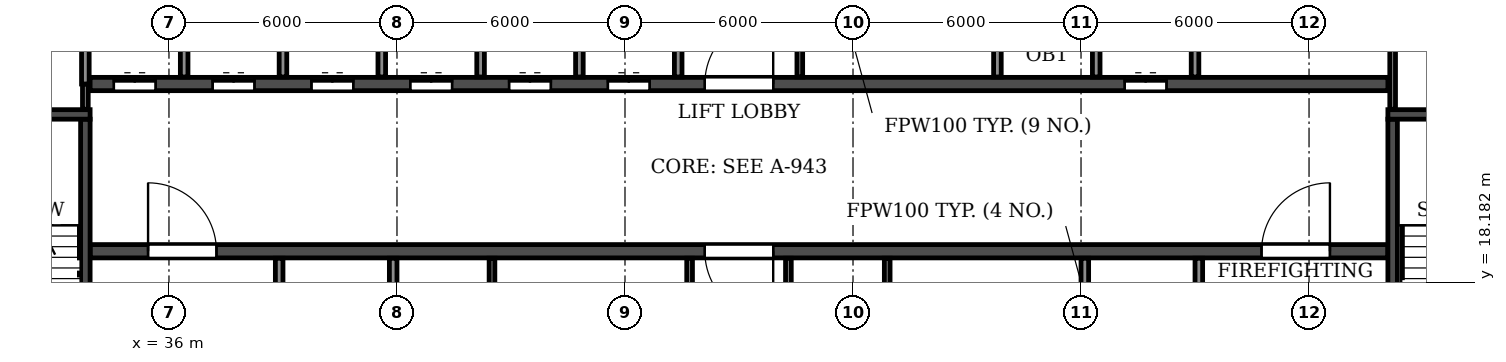
"""IFC4 building model, lengths in metres.
Left out: names, types, materials, properties, quantities, classifications, styles, units other than length and angle.
Written with IfcOpenShell. Run it as: python <this file> out.ifc"""

import sys

from ifc_helpers import new_model, si_unit, direction, frame, frame_2d, origin, place, context, subcontext, project, spatial, rectangle, extrude, element, fill, save


model = new_model("IFC4")
c1 = context("Model", 3, precision=1e-05, world=origin(), true_north=direction((0.0, 1.0)))
c2 = subcontext(c1, "Body", "Model", "MODEL_VIEW")
j1 = project(units=[si_unit("LENGTHUNIT", "METRE"), si_unit("PLANEANGLEUNIT", "RADIAN")], contexts=[c1])
p1 = place(None, origin())
s1 = spatial("IfcSite", under=j1, at=p1, CompositionType="ELEMENT")
p2 = place(p1, origin())
s2 = spatial("IfcBuilding", under=s1, at=p2, CompositionType="ELEMENT")
p3 = place(p2, frame((0.0, 0.0, 257.7)))
s3 = spatial("IfcBuildingStorey", under=s2, at=p3, CompositionType="ELEMENT", Elevation=257.7)
p4 = place(p3, frame((33.925, 19.0, 0.0), z_axis=(0.0, 0.0, 1.0), x_axis=(1.0, 0.0, 0.0)))
e1 = element("IfcWall", 1, at=p4, inside=s3, PredefinedType="SOLIDWALL", context=c2, shape_type="SweptSolid", body=[
    extrude(rectangle(XDim=34.15, YDim=0.35, at=frame_2d((17.075, 0.0))), origin(), (0.0, 0.0, 1.0), 3.0),
])
p5 = place(p4, frame((16.175, 0.0, 0.0)))
e2 = element("IfcOpeningElement", 2, at=p5, cuts=e1, PredefinedType="OPENING", context=c2, shape_type="SweptSolid", body=[
    extrude(rectangle(XDim=1.8, YDim=2.1, at=frame_2d((0.9, 1.05))), frame((0.0, 0.185, 0.0), z_axis=(0.0, -1.0, 0.0), x_axis=(1.0, 0.0, 0.0)), (0.0, 0.0, 1.0), 0.37),
])
p6 = place(p4, frame((1.525, 0.0, 0.0)))
e3 = element("IfcOpeningElement", 3, at=p6, cuts=e1, PredefinedType="OPENING", context=c2, shape_type="SweptSolid", body=[
    extrude(rectangle(XDim=1.8, YDim=2.1, at=frame_2d((0.9, 1.05))), frame((0.0, 0.185, 0.0), z_axis=(0.0, -1.0, 0.0), x_axis=(1.0, 0.0, 0.0)), (0.0, 0.0, 1.0), 0.37),
])
p7 = place(p4, frame((30.825, 0.0, 0.0)))
e4 = element("IfcOpeningElement", 4, at=p7, cuts=e1, PredefinedType="OPENING", context=c2, shape_type="SweptSolid", body=[
    extrude(rectangle(XDim=1.8, YDim=2.1, at=frame_2d((0.9, 1.05))), frame((0.0, 0.185, 0.0), z_axis=(0.0, -1.0, 0.0), x_axis=(1.0, 0.0, 0.0)), (0.0, 0.0, 1.0), 0.37),
])
p8 = place(p3, frame((33.925, 23.4, 0.0), z_axis=(0.0, 0.0, 1.0), x_axis=(1.0, 0.0, 0.0)))
e5 = element("IfcWall", 5, at=p8, inside=s3, PredefinedType="SOLIDWALL", context=c2, shape_type="SweptSolid", body=[
    extrude(rectangle(XDim=34.15, YDim=0.35, at=frame_2d((17.075, 0.0))), origin(), (0.0, 0.0, 1.0), 3.0),
])
p9 = place(p8, frame((16.175, 0.0, 0.0)))
e6 = element("IfcOpeningElement", 6, at=p9, cuts=e5, PredefinedType="OPENING", context=c2, shape_type="SweptSolid", body=[
    extrude(rectangle(XDim=1.8, YDim=2.1, at=frame_2d((0.9, 1.05))), frame((0.0, 0.185, 0.0), z_axis=(0.0, -1.0, 0.0), x_axis=(1.0, 0.0, 0.0)), (0.0, 0.0, 1.0), 0.37),
])
p10 = place(p8, frame((0.625, 0.0, 0.0)))
e7 = element("IfcOpeningElement", 7, at=p10, cuts=e5, PredefinedType="OPENING", context=c2, shape_type="SweptSolid", body=[
    extrude(rectangle(XDim=1.1, YDim=2.1, at=frame_2d((0.55, 1.05))), frame((0.0, 0.185, 0.0), z_axis=(0.0, -1.0, 0.0), x_axis=(1.0, 0.0, 0.0)), (0.0, 0.0, 1.0), 0.37),
])
p11 = place(p8, frame((3.225, 0.0, 0.0)))
e8 = element("IfcOpeningElement", 8, at=p11, cuts=e5, PredefinedType="OPENING", context=c2, shape_type="SweptSolid", body=[
    extrude(rectangle(XDim=1.1, YDim=2.1, at=frame_2d((0.55, 1.05))), frame((0.0, 0.185, 0.0), z_axis=(0.0, -1.0, 0.0), x_axis=(1.0, 0.0, 0.0)), (0.0, 0.0, 1.0), 0.37),
])
p12 = place(p8, frame((5.825, 0.0, 0.0)))
e9 = element("IfcOpeningElement", 9, at=p12, cuts=e5, PredefinedType="OPENING", context=c2, shape_type="SweptSolid", body=[
    extrude(rectangle(XDim=1.1, YDim=2.1, at=frame_2d((0.55, 1.05))), frame((0.0, 0.185, 0.0), z_axis=(0.0, -1.0, 0.0), x_axis=(1.0, 0.0, 0.0)), (0.0, 0.0, 1.0), 0.37),
])
p13 = place(p8, frame((8.425, 0.0, 0.0)))
e10 = element("IfcOpeningElement", 10, at=p13, cuts=e5, PredefinedType="OPENING", context=c2, shape_type="SweptSolid", body=[
    extrude(rectangle(XDim=1.1, YDim=2.1, at=frame_2d((0.55, 1.05))), frame((0.0, 0.185, 0.0), z_axis=(0.0, -1.0, 0.0), x_axis=(1.0, 0.0, 0.0)), (0.0, 0.0, 1.0), 0.37),
])
p14 = place(p8, frame((11.025, 0.0, 0.0)))
e11 = element("IfcOpeningElement", 11, at=p14, cuts=e5, PredefinedType="OPENING", context=c2, shape_type="SweptSolid", body=[
    extrude(rectangle(XDim=1.1, YDim=2.1, at=frame_2d((0.55, 1.05))), frame((0.0, 0.185, 0.0), z_axis=(0.0, -1.0, 0.0), x_axis=(1.0, 0.0, 0.0)), (0.0, 0.0, 1.0), 0.37),
])
p15 = place(p8, frame((13.625, 0.0, 0.0)))
e12 = element("IfcOpeningElement", 12, at=p15, cuts=e5, PredefinedType="OPENING", context=c2, shape_type="SweptSolid", body=[
    extrude(rectangle(XDim=1.1, YDim=2.1, at=frame_2d((0.55, 1.05))), frame((0.0, 0.185, 0.0), z_axis=(0.0, -1.0, 0.0), x_axis=(1.0, 0.0, 0.0)), (0.0, 0.0, 1.0), 0.37),
])
p16 = place(p8, frame((27.225, 0.0, 0.0)))
e13 = element("IfcOpeningElement", 13, at=p16, cuts=e5, PredefinedType="OPENING", context=c2, shape_type="SweptSolid", body=[
    extrude(rectangle(XDim=1.1, YDim=2.1, at=frame_2d((0.55, 1.05))), frame((0.0, 0.185, 0.0), z_axis=(0.0, -1.0, 0.0), x_axis=(1.0, 0.0, 0.0)), (0.0, 0.0, 1.0), 0.37),
])
p17 = place(p3, frame((33.8, 14.775, 0.0), z_axis=(0.0, 0.0, 1.0), x_axis=(0.0, 1.0, 0.0)))
e14 = element("IfcWall", 14, at=p17, inside=s3, PredefinedType="SOLIDWALL", context=c2, shape_type="SweptSolid", body=[
    extrude(rectangle(XDim=7.7, YDim=0.25, at=frame_2d((3.85, 0.0))), origin(), (0.0, 0.0, 1.0), 3.0),
])
p18 = place(p17, frame((0.525, 0.0, 0.0)))
e15 = element("IfcOpeningElement", 15, at=p18, cuts=e14, PredefinedType="OPENING", context=c2, shape_type="SweptSolid", body=[
    extrude(rectangle(XDim=1.0, YDim=2.1, at=frame_2d((0.5, 1.05))), frame((0.0, 0.135, 0.0), z_axis=(0.0, -1.0, 0.0), x_axis=(1.0, 0.0, 0.0)), (0.0, 0.0, 1.0), 0.27),
])
p19 = place(p3, frame((29.875, 22.6, 0.0), z_axis=(0.0, 0.0, 1.0), x_axis=(1.0, 0.0, 0.0)))
e16 = element("IfcWall", 16, at=p19, inside=s3, PredefinedType="SOLIDWALL", context=c2, shape_type="SweptSolid", body=[
    extrude(rectangle(XDim=4.05, YDim=0.25, at=frame_2d((2.025, 0.0))), origin(), (0.0, 0.0, 1.0), 3.0),
])
p20 = place(p3, frame((68.2, 14.775, 0.0), z_axis=(0.0, 0.0, 1.0), x_axis=(0.0, 1.0, 0.0)))
e17 = element("IfcWall", 17, at=p20, inside=s3, PredefinedType="SOLIDWALL", context=c2, shape_type="SweptSolid", body=[
    extrude(rectangle(XDim=7.7, YDim=0.25, at=frame_2d((3.85, 0.0))), origin(), (0.0, 0.0, 1.0), 3.0),
])
p21 = place(p20, frame((0.525, 0.0, 0.0)))
e18 = element("IfcOpeningElement", 18, at=p21, cuts=e17, PredefinedType="OPENING", context=c2, shape_type="SweptSolid", body=[
    extrude(rectangle(XDim=1.0, YDim=2.1, at=frame_2d((0.5, 1.05))), frame((0.0, 0.135, 0.0), z_axis=(0.0, -1.0, 0.0), x_axis=(1.0, 0.0, 0.0)), (0.0, 0.0, 1.0), 0.27),
])
p22 = place(p3, frame((68.075, 22.6, 0.0), z_axis=(0.0, 0.0, 1.0), x_axis=(1.0, 0.0, 0.0)))
e19 = element("IfcWall", 19, at=p22, inside=s3, PredefinedType="SOLIDWALL", context=c2, shape_type="SweptSolid", body=[
    extrude(rectangle(XDim=4.05, YDim=0.25, at=frame_2d((2.025, 0.0))), origin(), (0.0, 0.0, 1.0), 3.0),
])
for number, where, z_axis, x_axis in (
    (20, (49.7, 14.785, 0.0), (0.0, 0.0, 1.0), (0.0, 1.0, 0.0)),
    (21, (52.3, 14.785, 0.0), (0.0, 0.0, 1.0), (0.0, 1.0, 0.0)),
    (22, (52.6, 23.585, 0.0), (0.0, 0.0, 1.0), (0.0, 1.0, 0.0)),
    (23, (44.5, 14.785, 0.0), (0.0, 0.0, 1.0), (0.0, 1.0, 0.0)),
    (24, (54.9, 14.785, 0.0), (0.0, 0.0, 1.0), (0.0, 1.0, 0.0)),
):
    element("IfcWall", number, at=place(p3, frame(where, z_axis=z_axis, x_axis=x_axis)), inside=s3, PredefinedType="PARTITIONING", context=c2, shape_type="SweptSolid", body=[
        extrude(rectangle(XDim=4.03, YDim=0.15, at=frame_2d((2.015, 0.0))), origin(), (0.0, 0.0, 1.0), 3.0),
    ])
p23 = place(p3, frame((33.8, 22.735, 0.0), z_axis=(0.0, 0.0, 1.0), x_axis=(0.0, 1.0, 0.0)))
e25 = element("IfcWall", 25, at=p23, inside=s3, PredefinedType="PARTITIONING", context=c2, shape_type="SweptSolid", body=[
    extrude(rectangle(XDim=0.665, YDim=0.15, at=frame_2d((0.333, 0.0))), origin(), (0.0, 0.0, 1.0), 3.0),
])
p24 = place(p3, frame((68.2, 22.735, 0.0), z_axis=(0.0, 0.0, 1.0), x_axis=(0.0, 1.0, 0.0)))
e26 = element("IfcWall", 26, at=p24, inside=s3, PredefinedType="PARTITIONING", context=c2, shape_type="SweptSolid", body=[
    extrude(rectangle(XDim=4.88, YDim=0.15, at=frame_2d((2.44, 0.0))), origin(), (0.0, 0.0, 1.0), 3.0),
])
p25 = place(p3, frame((33.8, 23.4, 0.0), z_axis=(0.0, 0.0, 1.0), x_axis=(0.0, 1.0, 0.0)))
e27 = element("IfcWall", 27, at=p25, inside=s3, PredefinedType="PARTITIONING", context=c2, shape_type="SweptSolid", body=[
    extrude(rectangle(XDim=2.7, YDim=0.2, at=frame_2d((1.35, 0.0))), origin(), (0.0, 0.0, 1.0), 3.0),
])
p26 = place(p3, frame((36.4, 23.585, 0.0), z_axis=(0.0, 0.0, 1.0), x_axis=(0.0, 1.0, 0.0)))
e28 = element("IfcWall", 28, at=p26, inside=s3, PredefinedType="PARTITIONING", context=c2, shape_type="SweptSolid", body=[
    extrude(rectangle(XDim=2.515, YDim=0.2, at=frame_2d((1.258, 0.0))), origin(), (0.0, 0.0, 1.0), 3.0),
])
p27 = place(p3, frame((38.9, 14.785, 0.0), z_axis=(0.0, 0.0, 1.0), x_axis=(0.0, 1.0, 0.0)))
e29 = element("IfcWall", 29, at=p27, inside=s3, PredefinedType="PARTITIONING", context=c2, shape_type="SweptSolid", body=[
    extrude(rectangle(XDim=4.03, YDim=0.2, at=frame_2d((2.015, 0.0))), origin(), (0.0, 0.0, 1.0), 3.0),
])
p28 = place(p27, frame((1.465, 0.0, 0.0)))
e30 = element("IfcOpeningElement", 30, at=p28, cuts=e29, PredefinedType="OPENING", context=c2, shape_type="SweptSolid", body=[
    extrude(rectangle(XDim=1.1, YDim=2.1, at=frame_2d((0.55, 1.05))), frame((0.0, 0.11, 0.0), z_axis=(0.0, -1.0, 0.0), x_axis=(1.0, 0.0, 0.0)), (0.0, 0.0, 1.0), 0.22),
])
for number, where, z_axis, x_axis in (
    (31, (39.0, 23.585, 0.0), (0.0, 0.0, 1.0), (0.0, 1.0, 0.0)),
    (32, (41.6, 23.585, 0.0), (0.0, 0.0, 1.0), (0.0, 1.0, 0.0)),
):
    element("IfcWall", number, at=place(p3, frame(where, z_axis=z_axis, x_axis=x_axis)), inside=s3, PredefinedType="PARTITIONING", context=c2, shape_type="SweptSolid", body=[
        extrude(rectangle(XDim=2.515, YDim=0.2, at=frame_2d((1.258, 0.0))), origin(), (0.0, 0.0, 1.0), 3.0),
    ])
for number, where, z_axis, x_axis in (
    (33, (41.9, 14.785, 0.0), (0.0, 0.0, 1.0), (0.0, 1.0, 0.0)),
    (34, (44.2, 23.585, 0.0), (0.0, 0.0, 1.0), (0.0, 1.0, 0.0)),
    (35, (46.8, 23.585, 0.0), (0.0, 0.0, 1.0), (0.0, 1.0, 0.0)),
):
    element("IfcWall", number, at=place(p3, frame(where, z_axis=z_axis, x_axis=x_axis)), inside=s3, PredefinedType="PARTITIONING", context=c2, shape_type="SweptSolid", body=[
        extrude(rectangle(XDim=4.03, YDim=0.2, at=frame_2d((2.015, 0.0))), origin(), (0.0, 0.0, 1.0), 3.0),
    ])
for number, where, z_axis, x_axis in (
    (36, (49.4, 23.585, 0.0), (0.0, 0.0, 1.0), (0.0, 1.0, 0.0)),
    (37, (57.8, 23.585, 0.0), (0.0, 0.0, 1.0), (0.0, 1.0, 0.0)),
):
    element("IfcWall", number, at=place(p3, frame(where, z_axis=z_axis, x_axis=x_axis)), inside=s3, PredefinedType="PARTITIONING", context=c2, shape_type="SweptSolid", body=[
        extrude(rectangle(XDim=2.515, YDim=0.2, at=frame_2d((1.258, 0.0))), origin(), (0.0, 0.0, 1.0), 3.0),
    ])
p29 = place(p3, frame((60.1, 14.785, 0.0), z_axis=(0.0, 0.0, 1.0), x_axis=(0.0, 1.0, 0.0)))
e38 = element("IfcWall", 38, at=p29, inside=s3, PredefinedType="PARTITIONING", context=c2, shape_type="SweptSolid", body=[
    extrude(rectangle(XDim=4.03, YDim=0.2, at=frame_2d((2.015, 0.0))), origin(), (0.0, 0.0, 1.0), 3.0),
])
for number, where, z_axis, x_axis in (
    (39, (60.4, 23.585, 0.0), (0.0, 0.0, 1.0), (0.0, 1.0, 0.0)),
    (40, (63.0, 23.585, 0.0), (0.0, 0.0, 1.0), (0.0, 1.0, 0.0)),
):
    element("IfcWall", number, at=place(p3, frame(where, z_axis=z_axis, x_axis=x_axis)), inside=s3, PredefinedType="PARTITIONING", context=c2, shape_type="SweptSolid", body=[
        extrude(rectangle(XDim=2.515, YDim=0.2, at=frame_2d((1.258, 0.0))), origin(), (0.0, 0.0, 1.0), 3.0),
    ])
p30 = place(p3, frame((63.1, 14.785, 0.0), z_axis=(0.0, 0.0, 1.0), x_axis=(0.0, 1.0, 0.0)))
e41 = element("IfcWall", 41, at=p30, inside=s3, PredefinedType="PARTITIONING", context=c2, shape_type="SweptSolid", body=[
    extrude(rectangle(XDim=4.03, YDim=0.2, at=frame_2d((2.015, 0.0))), origin(), (0.0, 0.0, 1.0), 3.0),
])
p31 = place(p30, frame((1.465, 0.0, 0.0)))
e42 = element("IfcOpeningElement", 42, at=p31, cuts=e41, PredefinedType="OPENING", context=c2, shape_type="SweptSolid", body=[
    extrude(rectangle(XDim=1.1, YDim=2.1, at=frame_2d((0.55, 1.05))), frame((0.0, 0.11, 0.0), z_axis=(0.0, -1.0, 0.0), x_axis=(1.0, 0.0, 0.0)), (0.0, 0.0, 1.0), 0.22),
])
p32 = place(p9, origin())
e43 = element("IfcDoor", 43, at=p32, inside=s3, OperationType="DOUBLE_DOOR_SINGLE_SWING", PredefinedType="DOOR", context=c2, shape_type="SweptSolid", body=[
    extrude(rectangle(XDim=1.8, YDim=2.1, at=frame_2d((0.9, 1.05))), frame((0.0, 0.025, 0.0), z_axis=(0.0, -1.0, 0.0), x_axis=(1.0, 0.0, 0.0)), (0.0, 0.0, 1.0), 0.05),
])
fill(e6, e43)
p33 = place(p5, frame((1.8, 0.0, 0.0), z_axis=(0.0, 0.0, 1.0), x_axis=(-1.0, 0.0, 0.0)))
e44 = element("IfcDoor", 44, at=p33, inside=s3, OperationType="DOUBLE_DOOR_SINGLE_SWING", PredefinedType="DOOR", context=c2, shape_type="SweptSolid", body=[
    extrude(rectangle(XDim=1.8, YDim=2.1, at=frame_2d((0.9, 1.05))), frame((0.0, 0.025, 0.0), z_axis=(0.0, -1.0, 0.0), x_axis=(1.0, 0.0, 0.0)), (0.0, 0.0, 1.0), 0.05),
])
fill(e2, e44)
p34 = place(p10, origin())
e45 = element("IfcDoor", 45, at=p34, inside=s3, OperationType="DOUBLE_DOOR_SLIDING", PredefinedType="DOOR", context=c2, shape_type="SweptSolid", body=[
    extrude(rectangle(XDim=1.1, YDim=2.1, at=frame_2d((0.55, 1.05))), frame((0.0, 0.025, 0.0), z_axis=(0.0, -1.0, 0.0), x_axis=(1.0, 0.0, 0.0)), (0.0, 0.0, 1.0), 0.05),
])
fill(e7, e45)
p35 = place(p6, origin())
e46 = element("IfcDoor", 46, at=p35, inside=s3, OperationType="DOUBLE_DOOR_SINGLE_SWING", PredefinedType="DOOR", context=c2, shape_type="SweptSolid", body=[
    extrude(rectangle(XDim=1.8, YDim=2.1, at=frame_2d((0.9, 1.05))), frame((0.0, 0.025, 0.0), z_axis=(0.0, -1.0, 0.0), x_axis=(1.0, 0.0, 0.0)), (0.0, 0.0, 1.0), 0.05),
])
fill(e3, e46)
p36 = place(p11, origin())
e47 = element("IfcDoor", 47, at=p36, inside=s3, OperationType="DOUBLE_DOOR_SLIDING", PredefinedType="DOOR", context=c2, shape_type="SweptSolid", body=[
    extrude(rectangle(XDim=1.1, YDim=2.1, at=frame_2d((0.55, 1.05))), frame((0.0, 0.025, 0.0), z_axis=(0.0, -1.0, 0.0), x_axis=(1.0, 0.0, 0.0)), (0.0, 0.0, 1.0), 0.05),
])
fill(e8, e47)
p37 = place(p12, origin())
e48 = element("IfcDoor", 48, at=p37, inside=s3, OperationType="DOUBLE_DOOR_SLIDING", PredefinedType="DOOR", context=c2, shape_type="SweptSolid", body=[
    extrude(rectangle(XDim=1.1, YDim=2.1, at=frame_2d((0.55, 1.05))), frame((0.0, 0.025, 0.0), z_axis=(0.0, -1.0, 0.0), x_axis=(1.0, 0.0, 0.0)), (0.0, 0.0, 1.0), 0.05),
])
fill(e9, e48)
p38 = place(p13, origin())
e49 = element("IfcDoor", 49, at=p38, inside=s3, OperationType="DOUBLE_DOOR_SLIDING", PredefinedType="DOOR", context=c2, shape_type="SweptSolid", body=[
    extrude(rectangle(XDim=1.1, YDim=2.1, at=frame_2d((0.55, 1.05))), frame((0.0, 0.025, 0.0), z_axis=(0.0, -1.0, 0.0), x_axis=(1.0, 0.0, 0.0)), (0.0, 0.0, 1.0), 0.05),
])
fill(e10, e49)
p39 = place(p14, origin())
e50 = element("IfcDoor", 50, at=p39, inside=s3, OperationType="DOUBLE_DOOR_SLIDING", PredefinedType="DOOR", context=c2, shape_type="SweptSolid", body=[
    extrude(rectangle(XDim=1.1, YDim=2.1, at=frame_2d((0.55, 1.05))), frame((0.0, 0.025, 0.0), z_axis=(0.0, -1.0, 0.0), x_axis=(1.0, 0.0, 0.0)), (0.0, 0.0, 1.0), 0.05),
])
fill(e11, e50)
p40 = place(p15, origin())
e51 = element("IfcDoor", 51, at=p40, inside=s3, OperationType="DOUBLE_DOOR_SLIDING", PredefinedType="DOOR", context=c2, shape_type="SweptSolid", body=[
    extrude(rectangle(XDim=1.1, YDim=2.1, at=frame_2d((0.55, 1.05))), frame((0.0, 0.025, 0.0), z_axis=(0.0, -1.0, 0.0), x_axis=(1.0, 0.0, 0.0)), (0.0, 0.0, 1.0), 0.05),
])
fill(e12, e51)
p41 = place(p16, origin())
e52 = element("IfcDoor", 52, at=p41, inside=s3, OperationType="DOUBLE_DOOR_SLIDING", PredefinedType="DOOR", context=c2, shape_type="SweptSolid", body=[
    extrude(rectangle(XDim=1.1, YDim=2.1, at=frame_2d((0.55, 1.05))), frame((0.0, 0.025, 0.0), z_axis=(0.0, -1.0, 0.0), x_axis=(1.0, 0.0, 0.0)), (0.0, 0.0, 1.0), 0.05),
])
fill(e13, e52)
p42 = place(p7, origin())
e53 = element("IfcDoor", 53, at=p42, inside=s3, OperationType="DOUBLE_DOOR_SINGLE_SWING", PredefinedType="DOOR", context=c2, shape_type="SweptSolid", body=[
    extrude(rectangle(XDim=1.8, YDim=2.1, at=frame_2d((0.9, 1.05))), frame((0.0, 0.025, 0.0), z_axis=(0.0, -1.0, 0.0), x_axis=(1.0, 0.0, 0.0)), (0.0, 0.0, 1.0), 0.05),
])
fill(e4, e53)
save(model, sys.argv[1])
